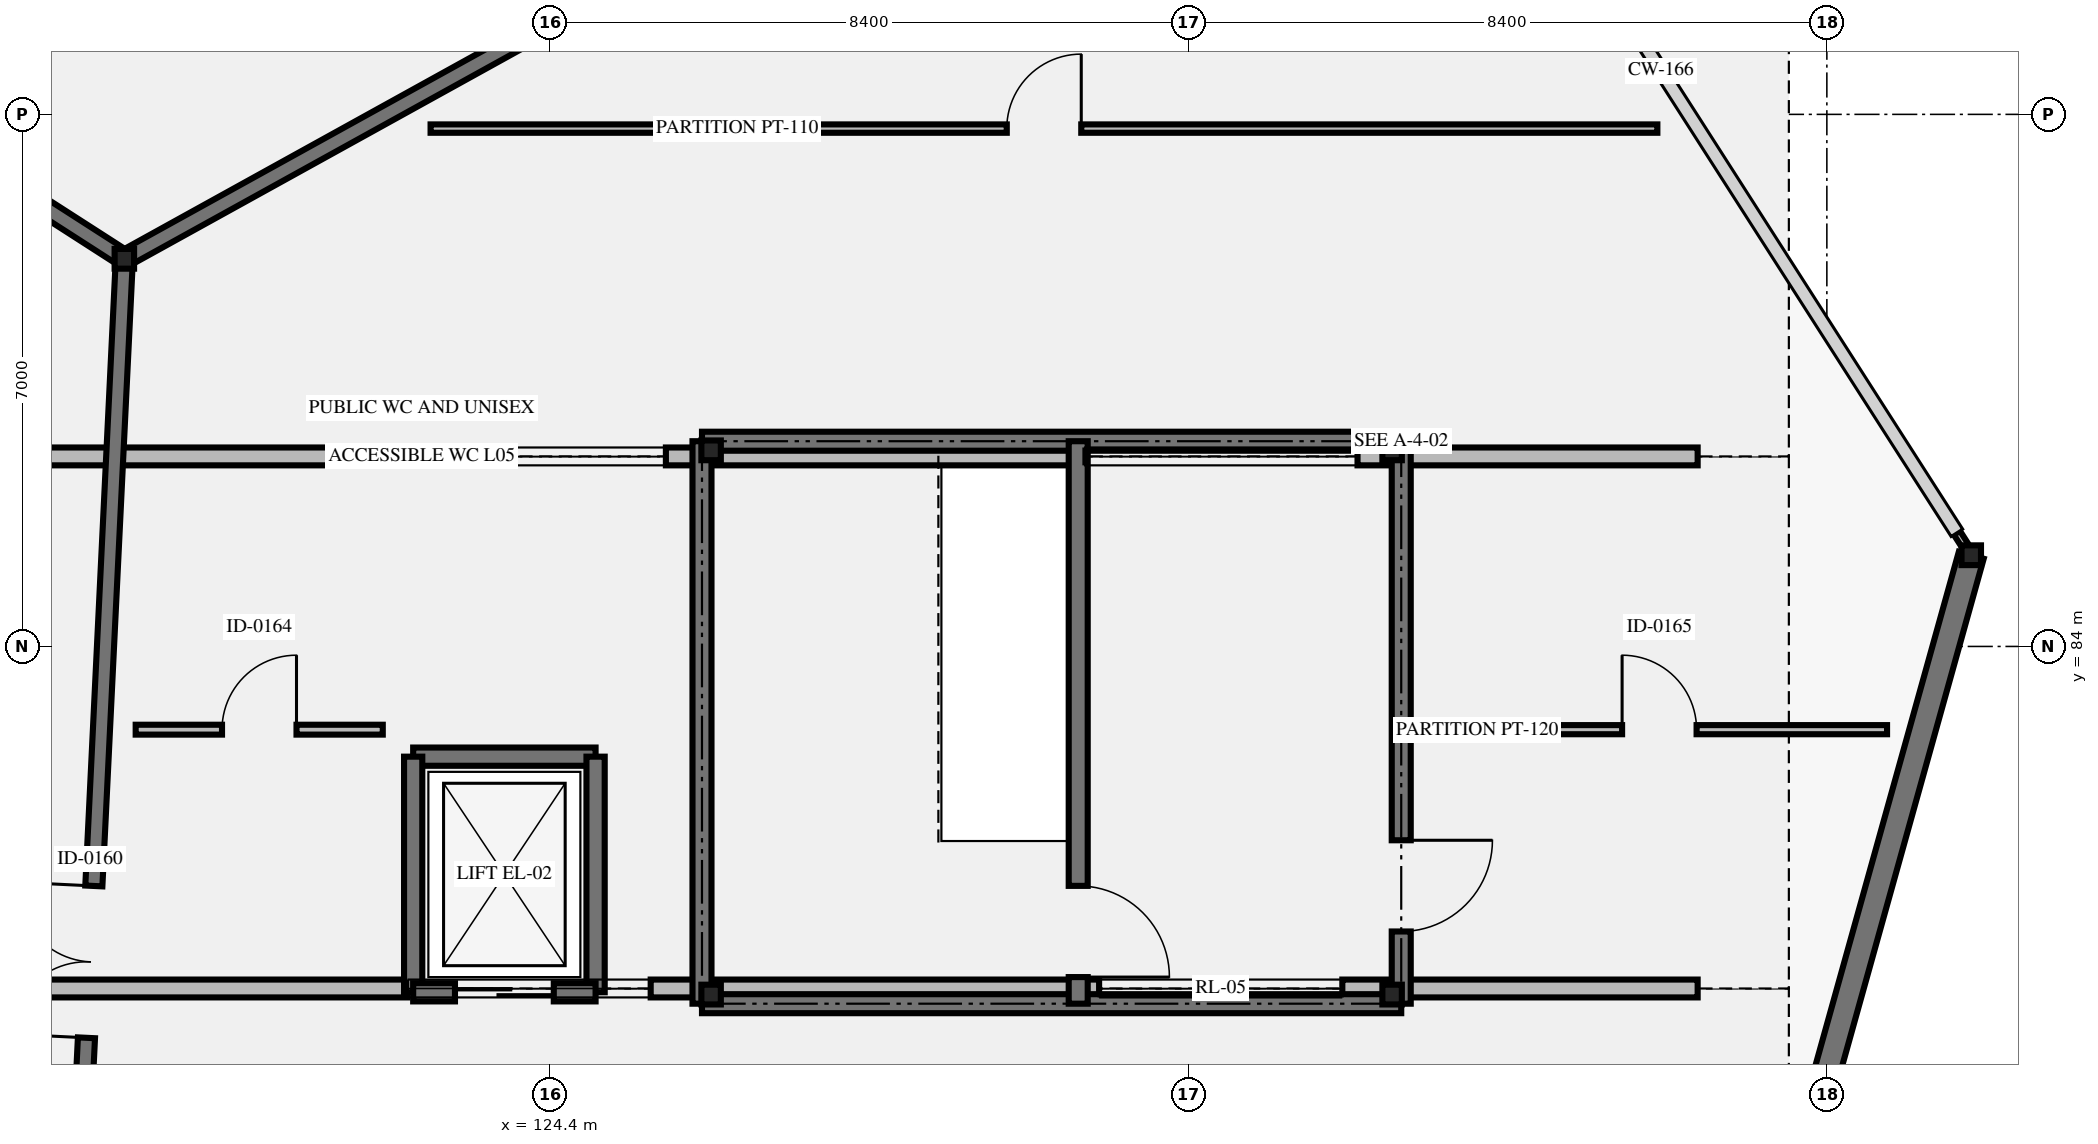
"""IFC4 building model, lengths in metres.
Left out: names, types, materials, properties, quantities, classifications, styles, units other than length and angle.
Written with IfcOpenShell. Run it as: python <this file> out.ifc"""

import sys

from ifc_helpers import new_model, si_unit, direction, frame, frame_2d, origin, origin_2d, place, context, subcontext, project, spatial, rectangle, i_section, extrude, element, fill, save


model = new_model("IFC4")
c1 = context("Model", 3, precision=1e-05, world=origin(), true_north=direction((0.0, 1.0)))
c2 = subcontext(c1, "Body", "Model", "MODEL_VIEW")
j1 = project(units=[si_unit("LENGTHUNIT", "METRE"), si_unit("PLANEANGLEUNIT", "RADIAN")], contexts=[c1])
p1 = place(None, origin())
s1 = spatial("IfcSite", under=j1, at=p1, CompositionType="ELEMENT")
p2 = place(p1, origin())
s2 = spatial("IfcBuilding", under=s1, at=p2, CompositionType="ELEMENT")
p3 = place(p2, frame((0.0, 0.0, 28.8)))
s3 = spatial("IfcBuildingStorey", under=s2, at=p3, CompositionType="ELEMENT", Elevation=28.8)
for number, where, z_axis, x_axis in (
    (1, (118.8, 89.1, 0.0), (0.0, 0.0, 1.0), (1.0, 0.0, 0.0)),
    (2, (143.1, 85.2, 0.0), (0.0, 0.0, 1.0), (1.0, 0.0, 0.0)),
    (3, (126.52, 79.42, 0.0), (0.0, 0.0, 1.0), (1.0, 0.0, 0.0)),
    (4, (135.48, 79.42, 0.0), (0.0, 0.0, 1.0), (1.0, 0.0, 0.0)),
    (5, (135.48, 86.58, 0.0), (0.0, 0.0, 1.0), (1.0, 0.0, 0.0)),
    (6, (126.52, 86.58, 0.0), (0.0, 0.0, 1.0), (1.0, 0.0, 0.0)),
):
    element("IfcColumn", number, at=place(p3, frame(where, z_axis=z_axis, x_axis=x_axis)), inside=s3, PredefinedType="COLUMN", context=c2, shape_type="SweptSolid", body=[
        extrude(i_section(OverallWidth=0.256, OverallDepth=0.26, WebThickness=0.01, FlangeThickness=0.017, FilletRadius=0.013, at=origin_2d()), origin(), (0.0, 0.0, 1.0), 6.6),
    ])
p4 = place(p3, frame((143.1, 85.2, 0.0), z_axis=(0.0, 0.0, 1.0), x_axis=(-0.268807620494, -0.96319388659, 0.0)))
e7 = element("IfcWall", 7, at=p4, inside=s3, PredefinedType="SOLIDWALL", context=c2, shape_type="SweptSolid", body=[
    extrude(rectangle(XDim=13.393, YDim=0.34, at=frame_2d((6.696, 0.0))), origin(), (0.0, 0.0, 1.0), 5.42),
])
p5 = place(p3, frame((142.911, 85.495, 0.0), z_axis=(0.0, 0.0, 1.0), x_axis=(0.538155087301, -0.842845835258, 0.0)))
e8 = element("IfcWall", 8, at=p5, inside=s3, PredefinedType="SOLIDWALL", context=c2, shape_type="SweptSolid", body=[
    extrude(rectangle(XDim=0.309, YDim=0.095, at=frame_2d((0.154, 0.0))), origin(), (0.0, 0.0, 1.0), 5.42),
])
p6 = place(p3, frame((139.5, 79.5, 6.25), z_axis=(0.0, 0.0, 1.0), x_axis=(-1.0, 0.0, 0.0)))
e9 = element("IfcWall", 9, at=p6, inside=s3, PredefinedType="SOLIDWALL", context=c2, shape_type="SweptSolid", body=[
    extrude(rectangle(XDim=41.0, YDim=0.235, at=frame_2d((20.5, 0.0))), origin(), (0.0, 0.0, 1.0), 5.13),
])
p7 = place(p6, frame((4.675, 0.0, 0.25)))
e10 = element("IfcOpeningElement", 10, at=p7, cuts=e9, PredefinedType="OPENING", context=c2, shape_type="SweptSolid", body=[
    extrude(rectangle(XDim=3.2, YDim=2.4, at=frame_2d((1.6, 1.2))), frame((0.0, 0.127, 0.0), z_axis=(0.0, -1.0, 0.0), x_axis=(1.0, 0.0, 0.0)), (0.0, 0.0, 1.0), 0.255),
])
p8 = place(p6, frame((13.775, 0.0, 0.25)))
e11 = element("IfcOpeningElement", 11, at=p8, cuts=e9, PredefinedType="OPENING", context=c2, shape_type="SweptSolid", body=[
    extrude(rectangle(XDim=3.2, YDim=2.4, at=frame_2d((1.6, 1.2))), frame((0.0, 0.127, 0.0), z_axis=(0.0, -1.0, 0.0), x_axis=(1.0, 0.0, 0.0)), (0.0, 0.0, 1.0), 0.255),
])
p9 = place(p6, frame((24.025, 0.0, 0.25)))
e12 = element("IfcOpeningElement", 12, at=p9, cuts=e9, PredefinedType="OPENING", context=c2, shape_type="SweptSolid", body=[
    extrude(rectangle(XDim=3.2, YDim=2.4, at=frame_2d((1.6, 1.2))), frame((0.0, 0.127, 0.0), z_axis=(0.0, -1.0, 0.0), x_axis=(1.0, 0.0, 0.0)), (0.0, 0.0, 1.0), 0.255),
])
p10 = place(p6, frame((34.275, 0.0, 0.25)))
e13 = element("IfcOpeningElement", 13, at=p10, cuts=e9, PredefinedType="OPENING", context=c2, shape_type="SweptSolid", body=[
    extrude(rectangle(XDim=3.2, YDim=2.4, at=frame_2d((1.6, 1.2))), frame((0.0, 0.127, 0.0), z_axis=(0.0, -1.0, 0.0), x_axis=(1.0, 0.0, 0.0)), (0.0, 0.0, 1.0), 0.255),
])
p11 = place(p3, frame((139.5, 86.5, 6.25), z_axis=(0.0, 0.0, 1.0), x_axis=(-1.0, 0.0, 0.0)))
e14 = element("IfcWall", 14, at=p11, inside=s3, PredefinedType="SOLIDWALL", context=c2, shape_type="SweptSolid", body=[
    extrude(rectangle(XDim=41.0, YDim=0.235, at=frame_2d((20.5, 0.0))), origin(), (0.0, 0.0, 1.0), 5.13),
])
p12 = place(p11, frame((4.475, 0.0, 0.25)))
e15 = element("IfcOpeningElement", 15, at=p12, cuts=e14, PredefinedType="OPENING", context=c2, shape_type="SweptSolid", body=[
    extrude(rectangle(XDim=3.6, YDim=2.4, at=frame_2d((1.8, 1.2))), frame((0.0, 0.127, 0.0), z_axis=(0.0, -1.0, 0.0), x_axis=(1.0, 0.0, 0.0)), (0.0, 0.0, 1.0), 0.255),
])
p13 = place(p11, frame((13.575, 0.0, 0.25)))
e16 = element("IfcOpeningElement", 16, at=p13, cuts=e14, PredefinedType="OPENING", context=c2, shape_type="SweptSolid", body=[
    extrude(rectangle(XDim=3.6, YDim=2.4, at=frame_2d((1.8, 1.2))), frame((0.0, 0.127, 0.0), z_axis=(0.0, -1.0, 0.0), x_axis=(1.0, 0.0, 0.0)), (0.0, 0.0, 1.0), 0.255),
])
p14 = place(p11, frame((23.825, 0.0, 0.25)))
e17 = element("IfcOpeningElement", 17, at=p14, cuts=e14, PredefinedType="OPENING", context=c2, shape_type="SweptSolid", body=[
    extrude(rectangle(XDim=3.6, YDim=2.4, at=frame_2d((1.8, 1.2))), frame((0.0, 0.127, 0.0), z_axis=(0.0, -1.0, 0.0), x_axis=(1.0, 0.0, 0.0)), (0.0, 0.0, 1.0), 0.255),
])
p15 = place(p11, frame((34.075, 0.0, 0.25)))
e18 = element("IfcOpeningElement", 18, at=p15, cuts=e14, PredefinedType="OPENING", context=c2, shape_type="SweptSolid", body=[
    extrude(rectangle(XDim=3.6, YDim=2.4, at=frame_2d((1.8, 1.2))), frame((0.0, 0.127, 0.0), z_axis=(0.0, -1.0, 0.0), x_axis=(1.0, 0.0, 0.0)), (0.0, 0.0, 1.0), 0.255),
])
p16 = place(p3, frame((117.9, 70.6, 0.0), z_axis=(0.0, 0.0, 1.0), x_axis=(0.048599072515, 0.998818366947, 0.0)))
e19 = element("IfcWall", 19, at=p16, inside=s3, PredefinedType="SOLIDWALL", context=c2, shape_type="SweptSolid", body=[
    extrude(rectangle(XDim=18.522, YDim=0.225, at=frame_2d((9.261, 0.0))), origin(), (0.0, 0.0, 1.0), 5.82),
])
p17 = place(p16, frame((8.261, 0.0, 0.0)))
e20 = element("IfcOpeningElement", 20, at=p17, cuts=e19, PredefinedType="OPENING", context=c2, shape_type="SweptSolid", body=[
    extrude(rectangle(XDim=2.0, YDim=2.5, at=frame_2d((1.0, 1.25))), frame((0.0, 0.123, 0.0), z_axis=(0.0, -1.0, 0.0), x_axis=(1.0, 0.0, 0.0)), (0.0, 0.0, 1.0), 0.245),
])
p18 = place(p3, frame((118.8, 89.1, 0.0), z_axis=(0.0, 0.0, 1.0), x_axis=(-0.841183241423, 0.540750177392, 0.0)))
e21 = element("IfcWall", 21, at=p18, inside=s3, PredefinedType="SOLIDWALL", context=c2, shape_type="SweptSolid", body=[
    extrude(rectangle(XDim=18.308, YDim=0.225, at=frame_2d((9.154, 0.0))), origin(), (0.0, 0.0, 1.0), 5.82),
])
p19 = place(p18, frame((8.229, 0.0, 0.0)))
e22 = element("IfcOpeningElement", 22, at=p19, cuts=e21, PredefinedType="OPENING", context=c2, shape_type="SweptSolid", body=[
    extrude(rectangle(XDim=1.85, YDim=2.4, at=frame_2d((0.925, 1.2))), frame((0.0, 0.123, 0.0), z_axis=(0.0, -1.0, 0.0), x_axis=(1.0, 0.0, 0.0)), (0.0, 0.0, 1.0), 0.245),
])
p20 = place(p3, frame((134.9, 98.0, 0.0), z_axis=(0.0, 0.0, 1.0), x_axis=(-0.875181353329, -0.483794996652, 0.0)))
e23 = element("IfcWall", 23, at=p20, inside=s3, PredefinedType="SOLIDWALL", context=c2, shape_type="SweptSolid", body=[
    extrude(rectangle(XDim=18.396, YDim=0.225, at=frame_2d((9.198, 0.0))), origin(), (0.0, 0.0, 1.0), 5.82),
])
p21 = place(p20, frame((8.098, 0.0, 0.0)))
e24 = element("IfcOpeningElement", 24, at=p21, cuts=e23, PredefinedType="OPENING", context=c2, shape_type="SweptSolid", body=[
    extrude(rectangle(XDim=2.2, YDim=2.6, at=frame_2d((1.1, 1.3))), frame((0.0, 0.123, 0.0), z_axis=(0.0, -1.0, 0.0), x_axis=(1.0, 0.0, 0.0)), (0.0, 0.0, 1.0), 0.245),
])
p22 = place(p3, frame((118.949, 82.905, 0.0), z_axis=(0.0, 0.0, 1.0), x_axis=(1.0, 0.0, 0.0)))
e25 = element("IfcWall", 25, at=p22, inside=s3, PredefinedType="PARTITIONING", context=c2, shape_type="SweptSolid", body=[
    extrude(rectangle(XDim=3.251, YDim=0.13, at=frame_2d((1.625, 0.0))), origin(), (0.0, 0.0, 1.0), 5.12),
])
p23 = place(p22, frame((1.136, 0.0, 0.0)))
e26 = element("IfcOpeningElement", 26, at=p23, cuts=e25, PredefinedType="OPENING", context=c2, shape_type="SweptSolid", body=[
    extrude(rectangle(XDim=0.98, YDim=2.15, at=frame_2d((0.49, 1.075))), frame((0.0, 0.075, 0.0), z_axis=(0.0, -1.0, 0.0), x_axis=(1.0, 0.0, 0.0)), (0.0, 0.0, 1.0), 0.15),
])
p24 = place(p3, frame((136.0, 82.905, 0.0), z_axis=(0.0, 0.0, 1.0), x_axis=(1.0, 0.0, 0.0)))
e27 = element("IfcWall", 27, at=p24, inside=s3, PredefinedType="PARTITIONING", context=c2, shape_type="SweptSolid", body=[
    extrude(rectangle(XDim=5.992, YDim=0.12, at=frame_2d((2.996, 0.0))), origin(), (0.0, 0.0, 1.0), 5.12),
])
p25 = place(p24, frame((2.506, 0.0, 0.0)))
e28 = element("IfcOpeningElement", 28, at=p25, cuts=e27, PredefinedType="OPENING", context=c2, shape_type="SweptSolid", body=[
    extrude(rectangle(XDim=0.98, YDim=2.15, at=frame_2d((0.49, 1.075))), frame((0.0, 0.07, 0.0), z_axis=(0.0, -1.0, 0.0), x_axis=(1.0, 0.0, 0.0)), (0.0, 0.0, 1.0), 0.14),
])
p26 = place(p3, frame((122.829, 90.813, 0.0), z_axis=(0.0, 0.0, 1.0), x_axis=(1.0, 0.0, 0.0)))
e29 = element("IfcWall", 29, at=p26, inside=s3, PredefinedType="PARTITIONING", context=c2, shape_type="SweptSolid", body=[
    extrude(rectangle(XDim=16.141, YDim=0.11, at=frame_2d((8.07, 0.0))), origin(), (0.0, 0.0, 1.0), 5.12),
])
p27 = place(p26, frame((7.581, 0.0, 0.0)))
e30 = element("IfcOpeningElement", 30, at=p27, cuts=e29, PredefinedType="OPENING", context=c2, shape_type="SweptSolid", body=[
    extrude(rectangle(XDim=0.98, YDim=2.15, at=frame_2d((0.49, 1.075))), frame((0.0, 0.065, 0.0), z_axis=(0.0, -1.0, 0.0), x_axis=(1.0, 0.0, 0.0)), (0.0, 0.0, 1.0), 0.13),
])
p28 = place(p3, frame((126.4, 79.3, 0.0), z_axis=(0.0, 0.0, 1.0), x_axis=(0.0, 1.0, 0.0)))
e31 = element("IfcWall", 31, at=p28, inside=s3, PredefinedType="SHEAR", context=c2, shape_type="SweptSolid", body=[
    extrude(rectangle(XDim=7.4, YDim=0.25, at=frame_2d((3.7, 0.0))), origin(), (0.0, 0.0, 1.0), 6.36),
])
for number, where, z_axis, x_axis in (
    (32, (126.4, 86.7, 0.0), (0.0, 0.0, 1.0), (1.0, 0.0, 0.0)),
    (33, (135.6, 79.3, 0.0), (0.0, 0.0, 1.0), (-1.0, 0.0, 0.0)),
):
    element("IfcWall", number, at=place(p3, frame(where, z_axis=z_axis, x_axis=x_axis)), inside=s3, PredefinedType="SHEAR", context=c2, shape_type="SweptSolid", body=[
        extrude(rectangle(XDim=9.2, YDim=0.25, at=frame_2d((4.6, 0.0))), origin(), (0.0, 0.0, 1.0), 6.36),
    ])
p29 = place(p3, frame((135.6, 86.7, 0.0), z_axis=(0.0, 0.0, 1.0), x_axis=(0.0, -1.0, 0.0)))
e34 = element("IfcWall", 34, at=p29, inside=s3, PredefinedType="SHEAR", context=c2, shape_type="SweptSolid", body=[
    extrude(rectangle(XDim=7.4, YDim=0.25, at=frame_2d((3.7, 0.0))), origin(), (0.0, 0.0, 1.0), 6.36),
])
p30 = place(p29, frame((5.25, 0.0, 0.0)))
e35 = element("IfcOpeningElement", 35, at=p30, cuts=e34, PredefinedType="OPENING", context=c2, shape_type="SweptSolid", body=[
    extrude(rectangle(XDim=1.2, YDim=2.2, at=frame_2d((0.6, 1.1))), frame((0.0, 0.135, 0.0), z_axis=(0.0, -1.0, 0.0), x_axis=(1.0, 0.0, 0.0)), (0.0, 0.0, 1.0), 0.27),
])
p31 = place(p3, frame((131.35, 86.7, 0.0), z_axis=(0.0, 0.0, 1.0), x_axis=(0.0, -1.0, 0.0)))
e36 = element("IfcWall", 36, at=p31, inside=s3, PredefinedType="SHEAR", context=c2, shape_type="SweptSolid", body=[
    extrude(rectangle(XDim=7.4, YDim=0.25, at=frame_2d((3.7, 0.0))), origin(), (0.0, 0.0, 1.0), 6.36),
])
p32 = place(p31, frame((5.85, 0.0, 0.0)))
e37 = element("IfcOpeningElement", 37, at=p32, cuts=e36, PredefinedType="OPENING", context=c2, shape_type="SweptSolid", body=[
    extrude(rectangle(XDim=1.2, YDim=2.2, at=frame_2d((0.6, 1.1))), frame((0.0, 0.135, 0.0), z_axis=(0.0, -1.0, 0.0), x_axis=(1.0, 0.0, 0.0)), (0.0, 0.0, 1.0), 0.27),
])
p33 = place(p3, frame((122.6, 82.55, 0.0), z_axis=(0.0, 0.0, 1.0), x_axis=(1.0, 0.0, 0.0)))
e38 = element("IfcWall", 38, at=p33, inside=s3, PredefinedType="SHEAR", context=c2, shape_type="SweptSolid", body=[
    extrude(rectangle(XDim=2.4, YDim=0.24, at=frame_2d((1.2, 0.0))), origin(), (0.0, 0.0, 1.0), 6.2),
])
for number, where, z_axis, x_axis in (
    (39, (125.0, 82.55, 0.0), (0.0, 0.0, 1.0), (0.0, -1.0, 0.0)),
    (40, (122.6, 79.45, 0.0), (0.0, 0.0, 1.0), (0.0, 1.0, 0.0)),
):
    element("IfcWall", number, at=place(p3, frame(where, z_axis=z_axis, x_axis=x_axis)), inside=s3, PredefinedType="SHEAR", context=c2, shape_type="SweptSolid", body=[
        extrude(rectangle(XDim=3.1, YDim=0.24, at=frame_2d((1.55, 0.0))), origin(), (0.0, 0.0, 1.0), 6.2),
    ])
p34 = place(p3, frame((125.0, 79.45, 0.0), z_axis=(0.0, 0.0, 1.0), x_axis=(-1.0, 0.0, 0.0)))
e41 = element("IfcWall", 41, at=p34, inside=s3, PredefinedType="SHEAR", context=c2, shape_type="SweptSolid", body=[
    extrude(rectangle(XDim=2.4, YDim=0.24, at=frame_2d((1.2, 0.0))), origin(), (0.0, 0.0, 1.0), 6.2),
])
p35 = place(p34, frame((0.55, 0.0, 0.0)))
e42 = element("IfcOpeningElement", 42, at=p35, cuts=e41, PredefinedType="OPENING", context=c2, shape_type="SweptSolid", body=[
    extrude(rectangle(XDim=1.3, YDim=2.25, at=frame_2d((0.65, 1.125))), frame((0.0, 0.13, 0.0), z_axis=(0.0, -1.0, 0.0), x_axis=(1.0, 0.0, 0.0)), (0.0, 0.0, 1.0), 0.26),
])
p36 = place(p7, origin())
e43 = element("IfcWindow", 43, at=p36, inside=s3, PartitioningType="SINGLE_PANEL", PredefinedType="SKYLIGHT", context=c2, shape_type="SweptSolid", body=[
    extrude(rectangle(XDim=3.2, YDim=2.4, at=frame_2d((1.6, 1.2))), frame((0.0, 0.03, 0.0), z_axis=(0.0, -1.0, 0.0), x_axis=(1.0, 0.0, 0.0)), (0.0, 0.0, 1.0), 0.06),
])
fill(e10, e43)
p37 = place(p8, origin())
e44 = element("IfcWindow", 44, at=p37, inside=s3, PartitioningType="SINGLE_PANEL", PredefinedType="SKYLIGHT", context=c2, shape_type="SweptSolid", body=[
    extrude(rectangle(XDim=3.2, YDim=2.4, at=frame_2d((1.6, 1.2))), frame((0.0, 0.03, 0.0), z_axis=(0.0, -1.0, 0.0), x_axis=(1.0, 0.0, 0.0)), (0.0, 0.0, 1.0), 0.06),
])
fill(e11, e44)
p38 = place(p12, origin())
e45 = element("IfcWindow", 45, at=p38, inside=s3, PartitioningType="SINGLE_PANEL", PredefinedType="SKYLIGHT", context=c2, shape_type="SweptSolid", body=[
    extrude(rectangle(XDim=3.6, YDim=2.4, at=frame_2d((1.8, 1.2))), frame((0.0, 0.03, 0.0), z_axis=(0.0, -1.0, 0.0), x_axis=(1.0, 0.0, 0.0)), (0.0, 0.0, 1.0), 0.06),
])
fill(e15, e45)
p39 = place(p13, origin())
e46 = element("IfcWindow", 46, at=p39, inside=s3, PartitioningType="SINGLE_PANEL", PredefinedType="SKYLIGHT", context=c2, shape_type="SweptSolid", body=[
    extrude(rectangle(XDim=3.6, YDim=2.4, at=frame_2d((1.8, 1.2))), frame((0.0, 0.03, 0.0), z_axis=(0.0, -1.0, 0.0), x_axis=(1.0, 0.0, 0.0)), (0.0, 0.0, 1.0), 0.06),
])
fill(e16, e46)
p40 = place(p17, origin())
e47 = element("IfcDoor", 47, at=p40, inside=s3, OperationType="DOUBLE_DOOR_SINGLE_SWING", PredefinedType="DOOR", context=c2, shape_type="SweptSolid", body=[
    extrude(rectangle(XDim=2.0, YDim=2.5, at=frame_2d((1.0, 1.25))), frame((0.0, 0.025, 0.0), z_axis=(0.0, -1.0, 0.0), x_axis=(1.0, 0.0, 0.0)), (0.0, 0.0, 1.0), 0.05),
])
fill(e20, e47)
p41 = place(p23, origin())
e48 = element("IfcDoor", 48, at=p41, inside=s3, OperationType="SINGLE_SWING_RIGHT", PredefinedType="DOOR", context=c2, shape_type="SweptSolid", body=[
    extrude(rectangle(XDim=0.98, YDim=2.15, at=frame_2d((0.49, 1.075))), frame((0.0, 0.025, 0.0), z_axis=(0.0, -1.0, 0.0), x_axis=(1.0, 0.0, 0.0)), (0.0, 0.0, 1.0), 0.05),
])
fill(e26, e48)
p42 = place(p25, origin())
e49 = element("IfcDoor", 49, at=p42, inside=s3, OperationType="SINGLE_SWING_LEFT", PredefinedType="DOOR", context=c2, shape_type="SweptSolid", body=[
    extrude(rectangle(XDim=0.98, YDim=2.15, at=frame_2d((0.49, 1.075))), frame((0.0, 0.025, 0.0), z_axis=(0.0, -1.0, 0.0), x_axis=(1.0, 0.0, 0.0)), (0.0, 0.0, 1.0), 0.05),
])
fill(e28, e49)
p43 = place(p27, origin())
e50 = element("IfcDoor", 50, at=p43, inside=s3, OperationType="SINGLE_SWING_RIGHT", PredefinedType="DOOR", context=c2, shape_type="SweptSolid", body=[
    extrude(rectangle(XDim=0.98, YDim=2.15, at=frame_2d((0.49, 1.075))), frame((0.0, 0.025, 0.0), z_axis=(0.0, -1.0, 0.0), x_axis=(1.0, 0.0, 0.0)), (0.0, 0.0, 1.0), 0.05),
])
fill(e30, e50)
p44 = place(p30, origin())
e51 = element("IfcDoor", 51, at=p44, inside=s3, OperationType="SINGLE_SWING_LEFT", PredefinedType="DOOR", context=c2, shape_type="SweptSolid", body=[
    extrude(rectangle(XDim=1.2, YDim=2.2, at=frame_2d((0.6, 1.1))), frame((0.0, 0.025, 0.0), z_axis=(0.0, -1.0, 0.0), x_axis=(1.0, 0.0, 0.0)), (0.0, 0.0, 1.0), 0.05),
])
fill(e35, e51)
p45 = place(p32, origin())
e52 = element("IfcDoor", 52, at=p45, inside=s3, OperationType="SINGLE_SWING_RIGHT", PredefinedType="DOOR", context=c2, shape_type="SweptSolid", body=[
    extrude(rectangle(XDim=1.2, YDim=2.2, at=frame_2d((0.6, 1.1))), frame((0.0, 0.025, 0.0), z_axis=(0.0, -1.0, 0.0), x_axis=(1.0, 0.0, 0.0)), (0.0, 0.0, 1.0), 0.05),
])
fill(e37, e52)
p46 = place(p35, origin())
e53 = element("IfcDoor", 53, at=p46, inside=s3, OperationType="SLIDING_TO_LEFT", PredefinedType="DOOR", context=c2, shape_type="SweptSolid", body=[
    extrude(rectangle(XDim=1.3, YDim=2.25, at=frame_2d((0.65, 1.125))), frame((0.0, 0.025, 0.0), z_axis=(0.0, -1.0, 0.0), x_axis=(1.0, 0.0, 0.0)), (0.0, 0.0, 1.0), 0.05),
])
fill(e42, e53)
save(model, sys.argv[1])
